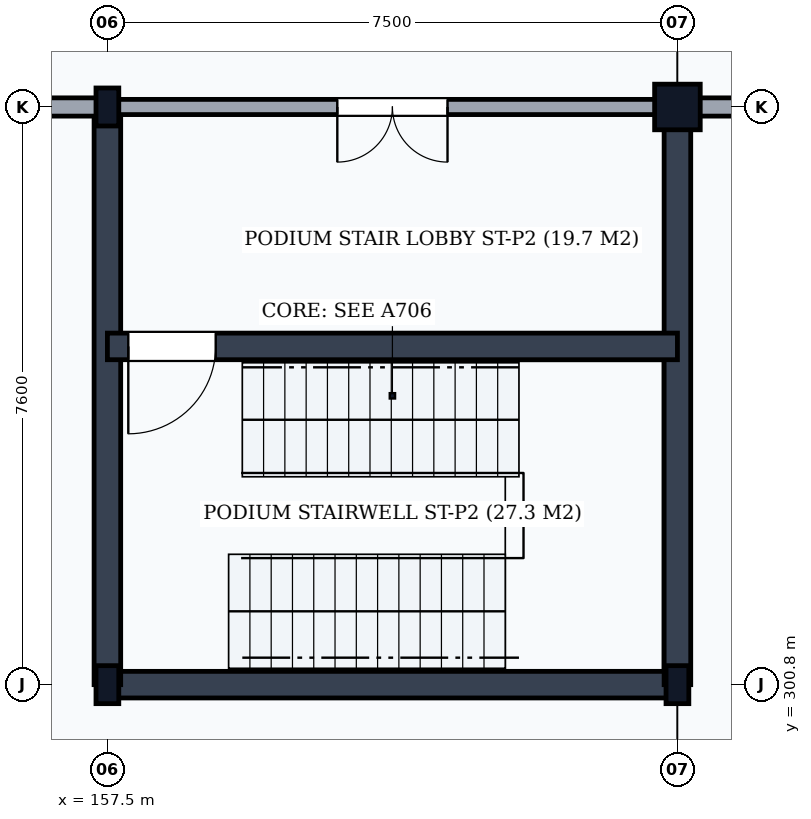
"""IFC4 building model, lengths in metres.
Left out: names, types, materials, properties, quantities, classifications, styles, units other than length and angle.
Written with IfcOpenShell. Run it as: python <this file> out.ifc"""

import sys

from ifc_helpers import new_model, si_unit, direction, frame, frame_2d, origin, origin_2d, place, context, subcontext, project, spatial, rectangle, i_section, extrude, element, fill, save


model = new_model("IFC4")
c1 = context("Model", 3, precision=1e-05, world=origin(), true_north=direction((0.0, 1.0)))
c2 = subcontext(c1, "Body", "Model", "MODEL_VIEW")
j1 = project(units=[si_unit("LENGTHUNIT", "METRE"), si_unit("PLANEANGLEUNIT", "RADIAN")], contexts=[c1])
p1 = place(None, origin())
s1 = spatial("IfcSite", under=j1, at=p1, CompositionType="ELEMENT")
p2 = place(p1, origin())
s2 = spatial("IfcBuilding", under=s1, at=p2, CompositionType="ELEMENT")
p3 = place(p2, frame((0.0, 0.0, -4.8)))
s3 = spatial("IfcBuildingStorey", under=s2, at=p3, CompositionType="ELEMENT", Elevation=-4.8)
for number, where, z_axis, x_axis in (
    (1, (157.5, 300.8, 0.0), (0.0, 0.0, 1.0), (1.0, 0.0, 0.0)),
    (2, (157.5, 308.4, 0.0), (0.0, 0.0, 1.0), (1.0, 0.0, 0.0)),
    (3, (165.0, 300.8, 0.0), (0.0, 0.0, 1.0), (1.0, 0.0, 0.0)),
):
    element("IfcColumn", number, at=place(p3, frame(where, z_axis=z_axis, x_axis=x_axis)), inside=s3, PredefinedType="COLUMN", context=c2, shape_type="SweptSolid", body=[
        extrude(i_section(OverallWidth=0.3, OverallDepth=0.5, WebThickness=0.014, FlangeThickness=0.028, FilletRadius=0.027, at=origin_2d()), origin(), (0.0, 0.0, 1.0), 4.8),
    ])
p4 = place(p3, frame((165.0, 308.4, 0.0), z_axis=(0.0, 0.0, 1.0), x_axis=(1.0, 0.0, 0.0)))
e4 = element("IfcColumn", 4, at=p4, inside=s3, PredefinedType="COLUMN", context=c2, shape_type="SweptSolid", body=[
    extrude(rectangle(XDim=0.6, YDim=0.6, at=origin_2d()), origin(), (0.0, 0.0, 1.0), 4.8),
])
p5 = place(p3, frame((157.5, 300.8, 0.0), z_axis=(0.0, 0.0, 1.0), x_axis=(1.0, 0.0, 0.0)))
e5 = element("IfcWall", 5, at=p5, inside=s3, PredefinedType="SHEAR", context=c2, shape_type="SweptSolid", body=[
    extrude(rectangle(XDim=7.5, YDim=0.35, at=frame_2d((3.75, 0.0))), origin(), (0.0, 0.0, 1.0), 4.51),
])
for number, where, z_axis, x_axis in (
    (6, (157.5, 300.8, 0.0), (0.0, 0.0, 1.0), (0.0, 1.0, 0.0)),
    (7, (165.0, 300.8, 0.0), (0.0, 0.0, 1.0), (0.0, 1.0, 0.0)),
):
    element("IfcWall", number, at=place(p3, frame(where, z_axis=z_axis, x_axis=x_axis)), inside=s3, PredefinedType="SHEAR", context=c2, shape_type="SweptSolid", body=[
        extrude(rectangle(XDim=7.6, YDim=0.35, at=frame_2d((3.8, 0.0))), origin(), (0.0, 0.0, 1.0), 4.51),
    ])
p6 = place(p3, frame((157.5, 305.25, 0.0), z_axis=(0.0, 0.0, 1.0), x_axis=(1.0, 0.0, 0.0)))
e8 = element("IfcWall", 8, at=p6, inside=s3, PredefinedType="SHEAR", context=c2, shape_type="SweptSolid", body=[
    extrude(rectangle(XDim=7.5, YDim=0.35, at=frame_2d((3.75, 0.0))), origin(), (0.0, 0.0, 1.0), 4.51),
])
p7 = place(p6, frame((0.275, 0.0, 0.0)))
e9 = element("IfcOpeningElement", 9, at=p7, cuts=e8, PredefinedType="OPENING", context=c2, shape_type="SweptSolid", body=[
    extrude(rectangle(XDim=1.15, YDim=2.15, at=frame_2d((0.575, 1.075))), frame((0.0, 0.19, 0.0), z_axis=(0.0, -1.0, 0.0), x_axis=(1.0, 0.0, 0.0)), (0.0, 0.0, 1.0), 0.38),
])
p8 = place(p3, frame((157.5, 308.4, 0.0), z_axis=(0.0, 0.0, 1.0), x_axis=(1.0, 0.0, 0.0)))
e10 = element("IfcWall", 10, at=p8, inside=s3, PredefinedType="PARTITIONING", context=c2, shape_type="SweptSolid", body=[
    extrude(rectangle(XDim=7.5, YDim=0.2, at=frame_2d((3.75, 0.0))), origin(), (0.0, 0.0, 1.0), 3.908),
])
p9 = place(p8, frame((3.025, 0.0, 0.0)))
e11 = element("IfcOpeningElement", 11, at=p9, cuts=e10, PredefinedType="OPENING", context=c2, shape_type="SweptSolid", body=[
    extrude(rectangle(XDim=1.45, YDim=2.2, at=frame_2d((0.725, 1.1))), frame((0.0, 0.115, 0.0), z_axis=(0.0, -1.0, 0.0), x_axis=(1.0, 0.0, 0.0)), (0.0, 0.0, 1.0), 0.23),
])
p10 = place(p3, frame((150.0, 308.4, 0.0), z_axis=(0.0, 0.0, 1.0), x_axis=(1.0, 0.0, 0.0)))
e12 = element("IfcWall", 12, at=p10, inside=s3, PredefinedType="PARTITIONING", context=c2, shape_type="SweptSolid", body=[
    extrude(rectangle(XDim=7.5, YDim=0.24, at=frame_2d((3.75, 0.0))), origin(), (0.0, 0.0, 1.0), 3.908),
])
p11 = place(p3, frame((165.0, 308.4, 0.0), z_axis=(0.0, 0.0, 1.0), x_axis=(1.0, 0.0, 0.0)))
e13 = element("IfcWall", 13, at=p11, inside=s3, PredefinedType="PARTITIONING", context=c2, shape_type="SweptSolid", body=[
    extrude(rectangle(XDim=32.0, YDim=0.24, at=frame_2d((16.0, 0.0))), origin(), (0.0, 0.0, 1.0), 3.858),
])
p12 = place(p7, frame((1.15, 0.0, 0.0), z_axis=(0.0, 0.0, 1.0), x_axis=(-1.0, 0.0, 0.0)))
e14 = element("IfcDoor", 14, at=p12, inside=s3, OperationType="SINGLE_SWING_RIGHT", PredefinedType="DOOR", context=c2, shape_type="SweptSolid", body=[
    extrude(rectangle(XDim=1.15, YDim=2.15, at=frame_2d((0.575, 1.075))), frame((0.0, 0.025, 0.0), z_axis=(0.0, -1.0, 0.0), x_axis=(1.0, 0.0, 0.0)), (0.0, 0.0, 1.0), 0.05),
])
fill(e9, e14)
p13 = place(p9, frame((1.45, 0.0, 0.0), z_axis=(0.0, 0.0, 1.0), x_axis=(-1.0, 0.0, 0.0)))
e15 = element("IfcDoor", 15, at=p13, inside=s3, OperationType="DOUBLE_DOOR_SINGLE_SWING", PredefinedType="DOOR", context=c2, shape_type="SweptSolid", body=[
    extrude(rectangle(XDim=1.45, YDim=2.2, at=frame_2d((0.725, 1.1))), frame((0.0, 0.025, 0.0), z_axis=(0.0, -1.0, 0.0), x_axis=(1.0, 0.0, 0.0)), (0.0, 0.0, 1.0), 0.05),
])
fill(e11, e15)
save(model, sys.argv[1])
